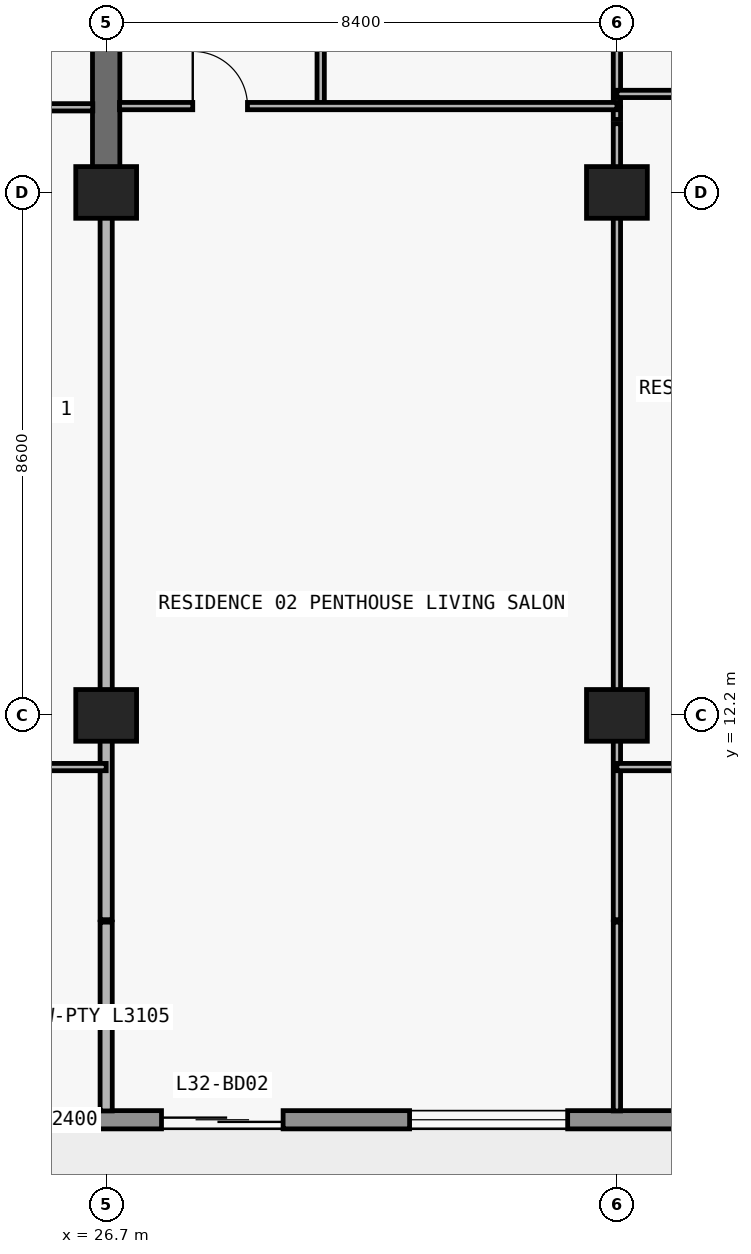
"""IFC4 building model, lengths in metres.
Left out: names, types, materials, properties, quantities, classifications, styles, units other than length and angle.
Written with IfcOpenShell. Run it as: python <this file> out.ifc"""

import sys

from ifc_helpers import new_model, si_unit, direction, frame, frame_2d, origin, origin_2d, place, context, subcontext, project, spatial, rectangle, extrude, element, fill, save


model = new_model("IFC4")
c1 = context("Model", 3, precision=1e-05, world=origin(), true_north=direction((0.0, 1.0)))
c2 = subcontext(c1, "Body", "Model", "MODEL_VIEW")
j1 = project(units=[si_unit("LENGTHUNIT", "METRE"), si_unit("PLANEANGLEUNIT", "RADIAN")], contexts=[c1])
p1 = place(None, origin())
s1 = spatial("IfcSite", under=j1, at=p1, CompositionType="ELEMENT")
p2 = place(p1, origin())
s2 = spatial("IfcBuilding", under=s1, at=p2, CompositionType="ELEMENT")
p3 = place(p2, frame((0.0, 0.0, 119.1)))
s3 = spatial("IfcBuildingStorey", under=s2, at=p3, CompositionType="ELEMENT", Elevation=119.1)
for number, where, z_axis, x_axis in (
    (1, (26.7, 12.2, 0.0), (0.0, 0.0, 1.0), (1.0, 0.0, 0.0)),
    (2, (35.1, 12.2, 0.0), (0.0, 0.0, 1.0), (1.0, 0.0, 0.0)),
    (3, (26.7, 20.8, 0.0), (0.0, 0.0, 1.0), (1.0, 0.0, 0.0)),
    (4, (35.1, 20.8, 0.0), (0.0, 0.0, 1.0), (1.0, 0.0, 0.0)),
):
    element("IfcColumn", number, at=place(p3, frame(where, z_axis=z_axis, x_axis=x_axis)), inside=s3, PredefinedType="COLUMN", context=c2, shape_type="SweptSolid", body=[
        extrude(rectangle(XDim=1.0, YDim=0.85, at=origin_2d()), origin(), (0.0, 0.0, 1.0), 3.05),
    ])
p4 = place(p3, frame((26.7, 20.8, 0.0), z_axis=(0.0, 0.0, 1.0), x_axis=(0.0, 1.0, 0.0)))
e5 = element("IfcWall", 5, at=p4, inside=s3, PredefinedType="SHEAR", context=c2, shape_type="SweptSolid", body=[
    extrude(rectangle(XDim=8.6, YDim=0.45, at=frame_2d((4.3, 0.0))), origin(), (0.0, 0.0, 1.0), 3.05),
])
p5 = place(p3, frame((70.1, 5.55, 0.0), z_axis=(0.0, 0.0, 1.0), x_axis=(-1.0, 0.0, 0.0)))
e6 = element("IfcWall", 6, at=p5, inside=s3, PredefinedType="STANDARD", context=c2, shape_type="SweptSolid", body=[
    extrude(rectangle(XDim=62.4, YDim=0.3, at=frame_2d((31.2, 0.0))), origin(), (0.0, 0.0, 1.0), 3.05),
])
p6 = place(p5, frame((57.29, 0.0, 0.0)))
e7 = element("IfcOpeningElement", 7, at=p6, cuts=e6, PredefinedType="OPENING", context=c2, shape_type="SweptSolid", body=[
    extrude(rectangle(XDim=2.0, YDim=2.3, at=frame_2d((1.0, 1.15))), frame((0.0, 0.16, 0.0), z_axis=(0.0, -1.0, 0.0), x_axis=(1.0, 0.0, 0.0)), (0.0, 0.0, 1.0), 0.32),
])
p7 = place(p5, frame((52.61, 0.0, 0.65)))
e8 = element("IfcOpeningElement", 8, at=p7, cuts=e6, PredefinedType="OPENING", context=c2, shape_type="SweptSolid", body=[
    extrude(rectangle(XDim=2.6, YDim=1.85, at=frame_2d((1.3, 0.925))), frame((0.0, 0.16, 0.0), z_axis=(0.0, -1.0, 0.0), x_axis=(1.0, 0.0, 0.0)), (0.0, 0.0, 1.0), 0.32),
])
p8 = place(p5, frame((46.5, 0.0, 0.85)))
e9 = element("IfcOpeningElement", 9, at=p8, cuts=e6, PredefinedType="OPENING", context=c2, shape_type="SweptSolid", body=[
    extrude(rectangle(XDim=2.2, YDim=1.55, at=frame_2d((1.1, 0.775))), frame((0.0, 0.16, 0.0), z_axis=(0.0, -1.0, 0.0), x_axis=(1.0, 0.0, 0.0)), (0.0, 0.0, 1.0), 0.32),
])
p9 = place(p5, frame((40.49, 0.0, 0.0)))
e10 = element("IfcOpeningElement", 10, at=p9, cuts=e6, PredefinedType="OPENING", context=c2, shape_type="SweptSolid", body=[
    extrude(rectangle(XDim=2.0, YDim=2.3, at=frame_2d((1.0, 1.15))), frame((0.0, 0.16, 0.0), z_axis=(0.0, -1.0, 0.0), x_axis=(1.0, 0.0, 0.0)), (0.0, 0.0, 1.0), 0.32),
])
p10 = place(p5, frame((35.81, 0.0, 0.65)))
e11 = element("IfcOpeningElement", 11, at=p10, cuts=e6, PredefinedType="OPENING", context=c2, shape_type="SweptSolid", body=[
    extrude(rectangle(XDim=2.6, YDim=1.85, at=frame_2d((1.3, 0.925))), frame((0.0, 0.16, 0.0), z_axis=(0.0, -1.0, 0.0), x_axis=(1.0, 0.0, 0.0)), (0.0, 0.0, 1.0), 0.32),
])
p11 = place(p5, frame((30.1, 0.0, 0.85)))
e12 = element("IfcOpeningElement", 12, at=p11, cuts=e6, PredefinedType="OPENING", context=c2, shape_type="SweptSolid", body=[
    extrude(rectangle(XDim=2.2, YDim=1.55, at=frame_2d((1.1, 0.775))), frame((0.0, 0.16, 0.0), z_axis=(0.0, -1.0, 0.0), x_axis=(1.0, 0.0, 0.0)), (0.0, 0.0, 1.0), 0.32),
])
p12 = place(p5, frame((24.426, 0.0, 0.0)))
e13 = element("IfcOpeningElement", 13, at=p12, cuts=e6, PredefinedType="OPENING", context=c2, shape_type="SweptSolid", body=[
    extrude(rectangle(XDim=2.0, YDim=2.3, at=frame_2d((1.0, 1.15))), frame((0.0, 0.16, 0.0), z_axis=(0.0, -1.0, 0.0), x_axis=(1.0, 0.0, 0.0)), (0.0, 0.0, 1.0), 0.32),
])
p13 = place(p5, frame((20.126, 0.0, 0.85)))
e14 = element("IfcOpeningElement", 14, at=p13, cuts=e6, PredefinedType="OPENING", context=c2, shape_type="SweptSolid", body=[
    extrude(rectangle(XDim=2.2, YDim=1.55, at=frame_2d((1.1, 0.775))), frame((0.0, 0.16, 0.0), z_axis=(0.0, -1.0, 0.0), x_axis=(1.0, 0.0, 0.0)), (0.0, 0.0, 1.0), 0.32),
])
p14 = place(p5, frame((15.69, 0.0, 0.0)))
e15 = element("IfcOpeningElement", 15, at=p14, cuts=e6, PredefinedType="OPENING", context=c2, shape_type="SweptSolid", body=[
    extrude(rectangle(XDim=2.0, YDim=2.3, at=frame_2d((1.0, 1.15))), frame((0.0, 0.16, 0.0), z_axis=(0.0, -1.0, 0.0), x_axis=(1.0, 0.0, 0.0)), (0.0, 0.0, 1.0), 0.32),
])
p15 = place(p5, frame((11.59, 0.0, 0.85)))
e16 = element("IfcOpeningElement", 16, at=p15, cuts=e6, PredefinedType="OPENING", context=c2, shape_type="SweptSolid", body=[
    extrude(rectangle(XDim=1.8, YDim=1.55, at=frame_2d((0.9, 0.775))), frame((0.0, 0.16, 0.0), z_axis=(0.0, -1.0, 0.0), x_axis=(1.0, 0.0, 0.0)), (0.0, 0.0, 1.0), 0.32),
])
p16 = place(p5, frame((7.626, 0.0, 0.0)))
e17 = element("IfcOpeningElement", 17, at=p16, cuts=e6, PredefinedType="OPENING", context=c2, shape_type="SweptSolid", body=[
    extrude(rectangle(XDim=2.0, YDim=2.3, at=frame_2d((1.0, 1.15))), frame((0.0, 0.16, 0.0), z_axis=(0.0, -1.0, 0.0), x_axis=(1.0, 0.0, 0.0)), (0.0, 0.0, 1.0), 0.32),
])
p17 = place(p5, frame((3.326, 0.0, 0.85)))
e18 = element("IfcOpeningElement", 18, at=p17, cuts=e6, PredefinedType="OPENING", context=c2, shape_type="SweptSolid", body=[
    extrude(rectangle(XDim=2.2, YDim=1.55, at=frame_2d((1.1, 0.775))), frame((0.0, 0.16, 0.0), z_axis=(0.0, -1.0, 0.0), x_axis=(1.0, 0.0, 0.0)), (0.0, 0.0, 1.0), 0.32),
])
p18 = place(p3, frame((26.7, 5.695, 0.0), z_axis=(0.0, 0.0, 1.0), x_axis=(0.0, 1.0, 0.0)))
e19 = element("IfcWall", 19, at=p18, inside=s3, PredefinedType="PARTITIONING", context=c2, shape_type="SweptSolid", body=[
    extrude(rectangle(XDim=3.105, YDim=0.2, at=frame_2d((1.552, 0.0))), origin(), (0.0, 0.0, 1.0), 3.05),
])
p19 = place(p3, frame((26.7, 8.84, 0.0), z_axis=(0.0, 0.0, 1.0), x_axis=(0.0, 1.0, 0.0)))
e20 = element("IfcWall", 20, at=p19, inside=s3, PredefinedType="PARTITIONING", context=c2, shape_type="SweptSolid", body=[
    extrude(rectangle(XDim=11.955, YDim=0.2, at=frame_2d((5.978, 0.0))), origin(), (0.0, 0.0, 1.0), 2.174),
])
p20 = place(p3, frame((30.228, 22.22, 0.0), z_axis=(0.0, 0.0, 1.0), x_axis=(0.0, 1.0, 0.0)))
e21 = element("IfcWall", 21, at=p20, inside=s3, PredefinedType="PARTITIONING", context=c2, shape_type="SweptSolid", body=[
    extrude(rectangle(XDim=4.38, YDim=0.12, at=frame_2d((2.19, 0.0))), origin(), (0.0, 0.0, 1.0), 3.05),
])
p21 = place(p20, frame((1.74, 0.0, 0.0)))
e22 = element("IfcOpeningElement", 22, at=p21, cuts=e21, PredefinedType="OPENING", context=c2, shape_type="SweptSolid", body=[
    extrude(rectangle(XDim=0.9, YDim=2.15, at=frame_2d((0.45, 1.075))), frame((0.0, 0.07, 0.0), z_axis=(0.0, -1.0, 0.0), x_axis=(1.0, 0.0, 0.0)), (0.0, 0.0, 1.0), 0.14),
])
p22 = place(p3, frame((35.1, 5.695, 0.0), z_axis=(0.0, 0.0, 1.0), x_axis=(0.0, 1.0, 0.0)))
e23 = element("IfcWall", 23, at=p22, inside=s3, PredefinedType="PARTITIONING", context=c2, shape_type="SweptSolid", body=[
    extrude(rectangle(XDim=3.105, YDim=0.12, at=frame_2d((1.552, 0.0))), origin(), (0.0, 0.0, 1.0), 3.05),
])
p23 = place(p3, frame((35.1, 8.84, 0.0), z_axis=(0.0, 0.0, 1.0), x_axis=(0.0, 1.0, 0.0)))
e24 = element("IfcWall", 24, at=p23, inside=s3, PredefinedType="PARTITIONING", context=c2, shape_type="SweptSolid", body=[
    extrude(rectangle(XDim=13.09, YDim=0.12, at=frame_2d((6.545, 0.0))), origin(), (0.0, 0.0, 1.0), 2.174),
])
p24 = place(p3, frame((35.1, 22.0, 0.0), z_axis=(0.0, 0.0, 1.0), x_axis=(0.0, 1.0, 0.0)))
e25 = element("IfcWall", 25, at=p24, inside=s3, PredefinedType="PARTITIONING", context=c2, shape_type="SweptSolid", body=[
    extrude(rectangle(XDim=0.2, YDim=0.12, at=frame_2d((0.1, 0.0))), origin(), (0.0, 0.0, 1.0), 2.174),
])
p25 = place(p3, frame((35.1, 22.22, 0.0), z_axis=(0.0, 0.0, 1.0), x_axis=(0.0, 1.0, 0.0)))
e26 = element("IfcWall", 26, at=p25, inside=s3, PredefinedType="PARTITIONING", context=c2, shape_type="SweptSolid", body=[
    extrude(rectangle(XDim=4.38, YDim=0.12, at=frame_2d((2.19, 0.0))), origin(), (0.0, 0.0, 1.0), 2.174),
])
p26 = place(p25, frame((1.84, 0.0, 0.0)))
e27 = element("IfcOpeningElement", 27, at=p26, cuts=e26, PredefinedType="OPENING", context=c2, shape_type="SweptSolid", body=[
    extrude(rectangle(XDim=0.9, YDim=2.124, at=frame_2d((0.45, 1.062))), frame((0.0, 0.07, 0.0), z_axis=(0.0, -1.0, 0.0), x_axis=(1.0, 0.0, 0.0)), (0.0, 0.0, 1.0), 0.14),
])
p27 = place(p3, frame((18.3, 11.35, 0.0), z_axis=(0.0, 0.0, 1.0), x_axis=(1.0, 0.0, 0.0)))
e28 = element("IfcWall", 28, at=p27, inside=s3, PredefinedType="PARTITIONING", context=c2, shape_type="SweptSolid", body=[
    extrude(rectangle(XDim=8.4, YDim=0.12, at=frame_2d((4.2, 0.0))), origin(), (0.0, 0.0, 1.0), 3.05),
])
p28 = place(p27, frame((3.75, 0.0, 0.0)))
e29 = element("IfcOpeningElement", 29, at=p28, cuts=e28, PredefinedType="OPENING", context=c2, shape_type="SweptSolid", body=[
    extrude(rectangle(XDim=0.9, YDim=2.15, at=frame_2d((0.45, 1.075))), frame((0.0, 0.07, 0.0), z_axis=(0.0, -1.0, 0.0), x_axis=(1.0, 0.0, 0.0)), (0.0, 0.0, 1.0), 0.14),
])
p29 = place(p3, frame((35.1, 11.35, 0.0), z_axis=(0.0, 0.0, 1.0), x_axis=(1.0, 0.0, 0.0)))
e30 = element("IfcWall", 30, at=p29, inside=s3, PredefinedType="PARTITIONING", context=c2, shape_type="SweptSolid", body=[
    extrude(rectangle(XDim=7.6, YDim=0.12, at=frame_2d((3.8, 0.0))), origin(), (0.0, 0.0, 1.0), 3.05),
])
p30 = place(p29, frame((3.35, 0.0, 0.0)))
e31 = element("IfcOpeningElement", 31, at=p30, cuts=e30, PredefinedType="OPENING", context=c2, shape_type="SweptSolid", body=[
    extrude(rectangle(XDim=0.9, YDim=2.15, at=frame_2d((0.45, 1.075))), frame((0.0, 0.07, 0.0), z_axis=(0.0, -1.0, 0.0), x_axis=(1.0, 0.0, 0.0)), (0.0, 0.0, 1.0), 0.14),
])
p31 = place(p3, frame((18.3, 22.2, 0.0), z_axis=(0.0, 0.0, 1.0), x_axis=(1.0, 0.0, 0.0)))
e32 = element("IfcWall", 32, at=p31, inside=s3, PredefinedType="PARTITIONING", context=c2, shape_type="SweptSolid", body=[
    extrude(rectangle(XDim=8.18, YDim=0.12, at=frame_2d((4.09, 0.0))), origin(), (0.0, 0.0, 1.0), 3.05),
])
p32 = place(p31, frame((3.64, 0.0, 0.0)))
e33 = element("IfcOpeningElement", 33, at=p32, cuts=e32, PredefinedType="OPENING", context=c2, shape_type="SweptSolid", body=[
    extrude(rectangle(XDim=0.9, YDim=2.15, at=frame_2d((0.45, 1.075))), frame((0.0, 0.07, 0.0), z_axis=(0.0, -1.0, 0.0), x_axis=(1.0, 0.0, 0.0)), (0.0, 0.0, 1.0), 0.14),
])
p33 = place(p3, frame((26.92, 22.22, 0.0), z_axis=(0.0, 0.0, 1.0), x_axis=(1.0, 0.0, 0.0)))
e34 = element("IfcWall", 34, at=p33, inside=s3, PredefinedType="PARTITIONING", context=c2, shape_type="SweptSolid", body=[
    extrude(rectangle(XDim=8.18, YDim=0.12, at=frame_2d((4.09, 0.0))), origin(), (0.0, 0.0, 1.0), 3.05),
])
p34 = place(p33, frame((1.204, 0.0, 0.0)))
e35 = element("IfcOpeningElement", 35, at=p34, cuts=e34, PredefinedType="OPENING", context=c2, shape_type="SweptSolid", body=[
    extrude(rectangle(XDim=0.9, YDim=2.15, at=frame_2d((0.45, 1.075))), frame((0.0, 0.07, 0.0), z_axis=(0.0, -1.0, 0.0), x_axis=(1.0, 0.0, 0.0)), (0.0, 0.0, 1.0), 0.14),
])
p35 = place(p3, frame((35.1, 22.42, 0.0), z_axis=(0.0, 0.0, 1.0), x_axis=(1.0, 0.0, 0.0)))
e36 = element("IfcWall", 36, at=p35, inside=s3, PredefinedType="PARTITIONING", context=c2, shape_type="SweptSolid", body=[
    extrude(rectangle(XDim=7.6, YDim=0.12, at=frame_2d((3.8, 0.0))), origin(), (0.0, 0.0, 1.0), 3.05),
])
p36 = place(p35, frame((3.35, 0.0, 0.0)))
e37 = element("IfcOpeningElement", 37, at=p36, cuts=e36, PredefinedType="OPENING", context=c2, shape_type="SweptSolid", body=[
    extrude(rectangle(XDim=0.9, YDim=2.15, at=frame_2d((0.45, 1.075))), frame((0.0, 0.07, 0.0), z_axis=(0.0, -1.0, 0.0), x_axis=(1.0, 0.0, 0.0)), (0.0, 0.0, 1.0), 0.14),
])
p37 = place(p9, origin())
e38 = element("IfcDoor", 38, at=p37, inside=s3, OperationType="DOUBLE_DOOR_SLIDING", PredefinedType="DOOR", context=c2, shape_type="SweptSolid", body=[
    extrude(rectangle(XDim=2.0, YDim=2.3, at=frame_2d((1.0, 1.15))), frame((0.0, 0.025, 0.0), z_axis=(0.0, -1.0, 0.0), x_axis=(1.0, 0.0, 0.0)), (0.0, 0.0, 1.0), 0.05),
])
fill(e10, e38)
p38 = place(p10, origin())
e39 = element("IfcWindow", 39, at=p38, inside=s3, PartitioningType="SINGLE_PANEL", PredefinedType="WINDOW", context=c2, shape_type="SweptSolid", body=[
    extrude(rectangle(XDim=2.6, YDim=1.85, at=frame_2d((1.3, 0.925))), frame((0.0, 0.03, 0.0), z_axis=(0.0, -1.0, 0.0), x_axis=(1.0, 0.0, 0.0)), (0.0, 0.0, 1.0), 0.06),
])
fill(e11, e39)
p39 = place(p34, origin())
e40 = element("IfcDoor", 40, at=p39, inside=s3, OperationType="SINGLE_SWING_LEFT", PredefinedType="DOOR", context=c2, shape_type="SweptSolid", body=[
    extrude(rectangle(XDim=0.9, YDim=2.15, at=frame_2d((0.45, 1.075))), frame((0.0, 0.025, 0.0), z_axis=(0.0, -1.0, 0.0), x_axis=(1.0, 0.0, 0.0)), (0.0, 0.0, 1.0), 0.05),
])
fill(e35, e40)
save(model, sys.argv[1])
